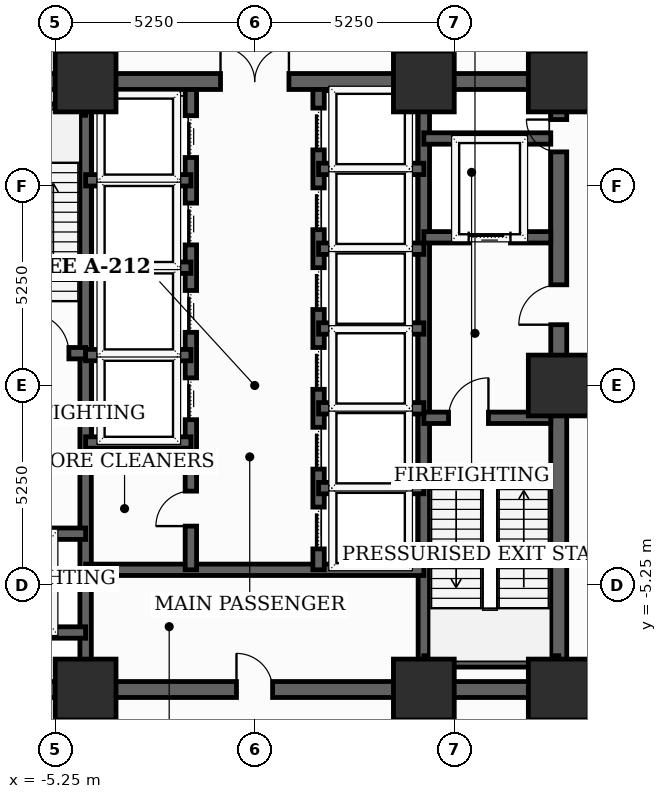
"""IFC4 building model, lengths in metres.
Left out: names, types, materials, properties, quantities, classifications, styles, units other than length and angle.
Written with IfcOpenShell. Run it as: python <this file> out.ifc"""

import sys

from ifc_helpers import new_model, si_unit, direction, frame, frame_2d, origin, origin_2d, place, context, subcontext, project, spatial, rectangle, extrude, element, fill, save


model = new_model("IFC4")
c1 = context("Model", 3, precision=1e-05, world=origin(), true_north=direction((0.0, 1.0)))
c2 = subcontext(c1, "Body", "Model", "MODEL_VIEW")
j1 = project(units=[si_unit("LENGTHUNIT", "METRE"), si_unit("PLANEANGLEUNIT", "RADIAN")], contexts=[c1])
p1 = place(None, origin())
s1 = spatial("IfcSite", under=j1, at=p1, CompositionType="ELEMENT")
p2 = place(p1, origin())
s2 = spatial("IfcBuilding", under=s1, at=p2, CompositionType="ELEMENT")
p3 = place(p2, frame((0.0, 0.0, 10.4)))
s3 = spatial("IfcBuildingStorey", under=s2, at=p3, CompositionType="ELEMENT", Elevation=10.4)
for number, where, z_axis, x_axis in (
    (1, (-4.45, -8.0, 0.0), (0.0, 0.0, 1.0), (1.0, 0.0, 0.0)),
    (2, (4.45, -8.0, 0.0), (0.0, 0.0, 1.0), (1.0, 0.0, 0.0)),
    (3, (8.0, -8.0, 0.0), (0.0, 0.0, 1.0), (1.0, 0.0, 0.0)),
    (4, (8.0, 0.0, 0.0), (0.0, 0.0, 1.0), (1.0, 0.0, 0.0)),
    (5, (8.0, 8.0, 0.0), (0.0, 0.0, 1.0), (1.0, 0.0, 0.0)),
    (6, (4.45, 8.0, 0.0), (0.0, 0.0, 1.0), (1.0, 0.0, 0.0)),
    (7, (-4.45, 8.0, 0.0), (0.0, 0.0, 1.0), (1.0, 0.0, 0.0)),
):
    element("IfcColumn", number, at=place(p3, frame(where, z_axis=z_axis, x_axis=x_axis)), inside=s3, PredefinedType="COLUMN", context=c2, shape_type="SweptSolid", body=[
        extrude(rectangle(XDim=1.6, YDim=1.6, at=origin_2d()), origin(), (0.0, 0.0, 1.0), 5.2),
    ])
p4 = place(p3, frame((8.0, -8.0, 0.0), z_axis=(0.0, 0.0, 1.0), x_axis=(0.0, 1.0, 0.0)))
e8 = element("IfcWall", 8, at=p4, inside=s3, PredefinedType="SHEAR", context=c2, shape_type="SweptSolid", body=[
    extrude(rectangle(XDim=16.0, YDim=0.42, at=frame_2d((8.0, 0.0))), origin(), (0.0, 0.0, 1.0), 4.95),
])
p5 = place(p4, frame((9.6, 0.0, 0.0)))
e9 = element("IfcOpeningElement", 9, at=p5, cuts=e8, PredefinedType="OPENING", context=c2, shape_type="SweptSolid", body=[
    extrude(rectangle(XDim=1.05, YDim=2.15, at=frame_2d((0.525, 1.075))), frame((0.0, 0.22, 0.0), z_axis=(0.0, -1.0, 0.0), x_axis=(1.0, 0.0, 0.0)), (0.0, 0.0, 1.0), 0.44),
])
p6 = place(p4, frame((14.148, 0.0, 0.0)))
e10 = element("IfcOpeningElement", 10, at=p6, cuts=e8, PredefinedType="OPENING", context=c2, shape_type="SweptSolid", body=[
    extrude(rectangle(XDim=0.85, YDim=2.02, at=frame_2d((0.425, 1.01))), frame((0.0, 0.22, 0.0), z_axis=(0.0, -1.0, 0.0), x_axis=(1.0, 0.0, 0.0)), (0.0, 0.0, 1.0), 0.44),
])
p7 = place(p3, frame((-8.0, -8.0, 0.0), z_axis=(0.0, 0.0, 1.0), x_axis=(1.0, 0.0, 0.0)))
e11 = element("IfcWall", 11, at=p7, inside=s3, PredefinedType="SHEAR", context=c2, shape_type="SweptSolid", body=[
    extrude(rectangle(XDim=16.0, YDim=0.42, at=frame_2d((8.0, 0.0))), origin(), (0.0, 0.0, 1.0), 4.95),
])
p8 = place(p7, frame((7.52, 0.0, 0.0)))
e12 = element("IfcOpeningElement", 12, at=p8, cuts=e11, PredefinedType="OPENING", context=c2, shape_type="SweptSolid", body=[
    extrude(rectangle(XDim=0.95, YDim=2.1, at=frame_2d((0.475, 1.05))), frame((0.0, 0.22, 0.0), z_axis=(0.0, -1.0, 0.0), x_axis=(1.0, 0.0, 0.0)), (0.0, 0.0, 1.0), 0.44),
])
p9 = place(p3, frame((-8.0, 8.0, 0.0), z_axis=(0.0, 0.0, 1.0), x_axis=(1.0, 0.0, 0.0)))
e13 = element("IfcWall", 13, at=p9, inside=s3, PredefinedType="SHEAR", context=c2, shape_type="SweptSolid", body=[
    extrude(rectangle(XDim=16.0, YDim=0.42, at=frame_2d((8.0, 0.0))), origin(), (0.0, 0.0, 1.0), 4.95),
])
p10 = place(p9, frame((7.1, 0.0, 0.0)))
e14 = element("IfcOpeningElement", 14, at=p10, cuts=e13, PredefinedType="OPENING", context=c2, shape_type="SweptSolid", body=[
    extrude(rectangle(XDim=1.8, YDim=2.15, at=frame_2d((0.9, 1.075))), frame((0.0, 0.22, 0.0), z_axis=(0.0, -1.0, 0.0), x_axis=(1.0, 0.0, 0.0)), (0.0, 0.0, 1.0), 0.44),
])
for number, where, z_axis, x_axis in (
    (15, (-4.45, -7.79, 0.0), (0.0, 0.0, 1.0), (0.0, 1.0, 0.0)),
    (16, (4.45, -7.79, 0.0), (0.0, 0.0, 1.0), (0.0, 1.0, 0.0)),
):
    element("IfcWall", number, at=place(p3, frame(where, z_axis=z_axis, x_axis=x_axis)), inside=s3, PredefinedType="SHEAR", context=c2, shape_type="SweptSolid", body=[
        extrude(rectangle(XDim=15.58, YDim=0.3, at=frame_2d((7.79, 0.0))), origin(), (0.0, 0.0, 1.0), 4.95),
    ])
p11 = place(p3, frame((-7.79, 0.85, 0.0), z_axis=(0.0, 0.0, 1.0), x_axis=(1.0, 0.0, 0.0)))
e17 = element("IfcWall", 17, at=p11, inside=s3, PredefinedType="SHEAR", context=c2, shape_type="SweptSolid", body=[
    extrude(rectangle(XDim=3.34, YDim=0.3, at=frame_2d((1.67, 0.0))), origin(), (0.0, 0.0, 1.0), 4.95),
])
p12 = place(p11, frame((1.85, 0.0, 0.0)))
e18 = element("IfcOpeningElement", 18, at=p12, cuts=e17, PredefinedType="OPENING", context=c2, shape_type="SweptSolid", body=[
    extrude(rectangle(XDim=1.05, YDim=2.15, at=frame_2d((0.525, 1.075))), frame((0.0, 0.16, 0.0), z_axis=(0.0, -1.0, 0.0), x_axis=(1.0, 0.0, 0.0)), (0.0, 0.0, 1.0), 0.32),
])
p13 = place(p3, frame((-7.79, 7.26, 0.0), z_axis=(0.0, 0.0, 1.0), x_axis=(1.0, 0.0, 0.0)))
e19 = element("IfcWall", 19, at=p13, inside=s3, PredefinedType="SHEAR", context=c2, shape_type="SweptSolid", body=[
    extrude(rectangle(XDim=3.34, YDim=0.3, at=frame_2d((1.67, 0.0))), origin(), (0.0, 0.0, 1.0), 4.95),
])
p14 = place(p3, frame((4.45, -0.85, 0.0), z_axis=(0.0, 0.0, 1.0), x_axis=(1.0, 0.0, 0.0)))
e20 = element("IfcWall", 20, at=p14, inside=s3, PredefinedType="SHEAR", context=c2, shape_type="SweptSolid", body=[
    extrude(rectangle(XDim=3.34, YDim=0.3, at=frame_2d((1.67, 0.0))), origin(), (0.0, 0.0, 1.0), 4.95),
])
p15 = place(p14, frame((0.65, 0.0, 0.0)))
e21 = element("IfcOpeningElement", 21, at=p15, cuts=e20, PredefinedType="OPENING", context=c2, shape_type="SweptSolid", body=[
    extrude(rectangle(XDim=1.05, YDim=2.15, at=frame_2d((0.525, 1.075))), frame((0.0, 0.16, 0.0), z_axis=(0.0, -1.0, 0.0), x_axis=(1.0, 0.0, 0.0)), (0.0, 0.0, 1.0), 0.32),
])
p16 = place(p3, frame((4.45, -7.26, 0.0), z_axis=(0.0, 0.0, 1.0), x_axis=(1.0, 0.0, 0.0)))
e22 = element("IfcWall", 22, at=p16, inside=s3, PredefinedType="SHEAR", context=c2, shape_type="SweptSolid", body=[
    extrude(rectangle(XDim=3.55, YDim=0.3, at=frame_2d((1.775, 0.0))), origin(), (0.0, 0.0, 1.0), 4.95),
])
p17 = place(p3, frame((-7.79, -3.9, 0.0), z_axis=(0.0, 0.0, 1.0), x_axis=(1.0, 0.0, 0.0)))
e23 = element("IfcWall", 23, at=p17, inside=s3, PredefinedType="SHEAR", context=c2, shape_type="SweptSolid", body=[
    extrude(rectangle(XDim=3.34, YDim=0.3, at=frame_2d((1.67, 0.0))), origin(), (0.0, 0.0, 1.0), 4.95),
])
p18 = place(p17, frame((1.27, 0.0, 0.0)))
e24 = element("IfcOpeningElement", 24, at=p18, cuts=e23, PredefinedType="OPENING", context=c2, shape_type="SweptSolid", body=[
    extrude(rectangle(XDim=1.1, YDim=2.1, at=frame_2d((0.55, 1.05))), frame((0.0, 0.16, 0.0), z_axis=(0.0, -1.0, 0.0), x_axis=(1.0, 0.0, 0.0)), (0.0, 0.0, 1.0), 0.32),
])
p19 = place(p3, frame((-7.79, -6.5, 0.0), z_axis=(0.0, 0.0, 1.0), x_axis=(1.0, 0.0, 0.0)))
e25 = element("IfcWall", 25, at=p19, inside=s3, PredefinedType="SHEAR", context=c2, shape_type="SweptSolid", body=[
    extrude(rectangle(XDim=3.34, YDim=0.3, at=frame_2d((1.67, 0.0))), origin(), (0.0, 0.0, 1.0), 4.95),
])
p20 = place(p3, frame((4.45, 3.9, 0.0), z_axis=(0.0, 0.0, 1.0), x_axis=(1.0, 0.0, 0.0)))
e26 = element("IfcWall", 26, at=p20, inside=s3, PredefinedType="SHEAR", context=c2, shape_type="SweptSolid", body=[
    extrude(rectangle(XDim=3.34, YDim=0.3, at=frame_2d((1.67, 0.0))), origin(), (0.0, 0.0, 1.0), 4.95),
])
p21 = place(p20, frame((1.18, 0.0, 0.0)))
e27 = element("IfcOpeningElement", 27, at=p21, cuts=e26, PredefinedType="OPENING", context=c2, shape_type="SweptSolid", body=[
    extrude(rectangle(XDim=1.1, YDim=2.1, at=frame_2d((0.55, 1.05))), frame((0.0, 0.16, 0.0), z_axis=(0.0, -1.0, 0.0), x_axis=(1.0, 0.0, 0.0)), (0.0, 0.0, 1.0), 0.32),
])
p22 = place(p3, frame((4.45, 6.5, 0.0), z_axis=(0.0, 0.0, 1.0), x_axis=(1.0, 0.0, 0.0)))
e28 = element("IfcWall", 28, at=p22, inside=s3, PredefinedType="SHEAR", context=c2, shape_type="SweptSolid", body=[
    extrude(rectangle(XDim=3.34, YDim=0.3, at=frame_2d((1.67, 0.0))), origin(), (0.0, 0.0, 1.0), 4.95),
])
p23 = place(p3, frame((-4.45, -4.85, 0.0), z_axis=(0.0, 0.0, 1.0), x_axis=(1.0, 0.0, 0.0)))
e29 = element("IfcWall", 29, at=p23, inside=s3, PredefinedType="SHEAR", context=c2, shape_type="SweptSolid", body=[
    extrude(rectangle(XDim=8.9, YDim=0.3, at=frame_2d((4.45, 0.0))), origin(), (0.0, 0.0, 1.0), 4.95),
])
p24 = place(p3, frame((-1.68, -4.85, 0.0), z_axis=(0.0, 0.0, 1.0), x_axis=(0.0, 1.0, 0.0)))
e30 = element("IfcWall", 30, at=p24, inside=s3, PredefinedType="SHEAR", context=c2, shape_type="SweptSolid", body=[
    extrude(rectangle(XDim=12.64, YDim=0.3, at=frame_2d((6.32, 0.0))), origin(), (0.0, 0.0, 1.0), 4.95),
])
p25 = place(p24, frame((3.95, 0.0, 0.0)))
e31 = element("IfcOpeningElement", 31, at=p25, cuts=e30, PredefinedType="OPENING", context=c2, shape_type="SweptSolid", body=[
    extrude(rectangle(XDim=1.1, YDim=2.1, at=frame_2d((0.55, 1.05))), frame((0.0, 0.16, 0.0), z_axis=(0.0, -1.0, 0.0), x_axis=(1.0, 0.0, 0.0)), (0.0, 0.0, 1.0), 0.32),
])
p26 = place(p24, frame((6.25, 0.0, 0.0)))
e32 = element("IfcOpeningElement", 32, at=p26, cuts=e30, PredefinedType="OPENING", context=c2, shape_type="SweptSolid", body=[
    extrude(rectangle(XDim=1.1, YDim=2.1, at=frame_2d((0.55, 1.05))), frame((0.0, 0.16, 0.0), z_axis=(0.0, -1.0, 0.0), x_axis=(1.0, 0.0, 0.0)), (0.0, 0.0, 1.0), 0.32),
])
p27 = place(p24, frame((8.55, 0.0, 0.0)))
e33 = element("IfcOpeningElement", 33, at=p27, cuts=e30, PredefinedType="OPENING", context=c2, shape_type="SweptSolid", body=[
    extrude(rectangle(XDim=1.1, YDim=2.1, at=frame_2d((0.55, 1.05))), frame((0.0, 0.16, 0.0), z_axis=(0.0, -1.0, 0.0), x_axis=(1.0, 0.0, 0.0)), (0.0, 0.0, 1.0), 0.32),
])
p28 = place(p24, frame((10.85, 0.0, 0.0)))
e34 = element("IfcOpeningElement", 34, at=p28, cuts=e30, PredefinedType="OPENING", context=c2, shape_type="SweptSolid", body=[
    extrude(rectangle(XDim=1.1, YDim=2.1, at=frame_2d((0.55, 1.05))), frame((0.0, 0.16, 0.0), z_axis=(0.0, -1.0, 0.0), x_axis=(1.0, 0.0, 0.0)), (0.0, 0.0, 1.0), 0.32),
])
p29 = place(p24, frame((1.15, 0.0, 0.0)))
e35 = element("IfcOpeningElement", 35, at=p29, cuts=e30, PredefinedType="OPENING", context=c2, shape_type="SweptSolid", body=[
    extrude(rectangle(XDim=0.92, YDim=2.1, at=frame_2d((0.46, 1.05))), frame((0.0, 0.16, 0.0), z_axis=(0.0, -1.0, 0.0), x_axis=(1.0, 0.0, 0.0)), (0.0, 0.0, 1.0), 0.32),
])
p30 = place(p3, frame((1.68, -4.85, 0.0), z_axis=(0.0, 0.0, 1.0), x_axis=(0.0, 1.0, 0.0)))
e36 = element("IfcWall", 36, at=p30, inside=s3, PredefinedType="SHEAR", context=c2, shape_type="SweptSolid", body=[
    extrude(rectangle(XDim=12.64, YDim=0.3, at=frame_2d((6.32, 0.0))), origin(), (0.0, 0.0, 1.0), 4.95),
])
p31 = place(p30, frame((0.55, 0.0, 0.0)))
e37 = element("IfcOpeningElement", 37, at=p31, cuts=e36, PredefinedType="OPENING", context=c2, shape_type="SweptSolid", body=[
    extrude(rectangle(XDim=1.1, YDim=2.1, at=frame_2d((0.55, 1.05))), frame((0.0, 0.16, 0.0), z_axis=(0.0, -1.0, 0.0), x_axis=(1.0, 0.0, 0.0)), (0.0, 0.0, 1.0), 0.32),
])
p32 = place(p30, frame((2.65, 0.0, 0.0)))
e38 = element("IfcOpeningElement", 38, at=p32, cuts=e36, PredefinedType="OPENING", context=c2, shape_type="SweptSolid", body=[
    extrude(rectangle(XDim=1.1, YDim=2.1, at=frame_2d((0.55, 1.05))), frame((0.0, 0.16, 0.0), z_axis=(0.0, -1.0, 0.0), x_axis=(1.0, 0.0, 0.0)), (0.0, 0.0, 1.0), 0.32),
])
p33 = place(p30, frame((4.75, 0.0, 0.0)))
e39 = element("IfcOpeningElement", 39, at=p33, cuts=e36, PredefinedType="OPENING", context=c2, shape_type="SweptSolid", body=[
    extrude(rectangle(XDim=1.1, YDim=2.1, at=frame_2d((0.55, 1.05))), frame((0.0, 0.16, 0.0), z_axis=(0.0, -1.0, 0.0), x_axis=(1.0, 0.0, 0.0)), (0.0, 0.0, 1.0), 0.32),
])
p34 = place(p30, frame((6.85, 0.0, 0.0)))
e40 = element("IfcOpeningElement", 40, at=p34, cuts=e36, PredefinedType="OPENING", context=c2, shape_type="SweptSolid", body=[
    extrude(rectangle(XDim=1.1, YDim=2.1, at=frame_2d((0.55, 1.05))), frame((0.0, 0.16, 0.0), z_axis=(0.0, -1.0, 0.0), x_axis=(1.0, 0.0, 0.0)), (0.0, 0.0, 1.0), 0.32),
])
p35 = place(p30, frame((8.95, 0.0, 0.0)))
e41 = element("IfcOpeningElement", 41, at=p35, cuts=e36, PredefinedType="OPENING", context=c2, shape_type="SweptSolid", body=[
    extrude(rectangle(XDim=1.1, YDim=2.1, at=frame_2d((0.55, 1.05))), frame((0.0, 0.16, 0.0), z_axis=(0.0, -1.0, 0.0), x_axis=(1.0, 0.0, 0.0)), (0.0, 0.0, 1.0), 0.32),
])
p36 = place(p30, frame((11.05, 0.0, 0.0)))
e42 = element("IfcOpeningElement", 42, at=p36, cuts=e36, PredefinedType="OPENING", context=c2, shape_type="SweptSolid", body=[
    extrude(rectangle(XDim=1.1, YDim=2.1, at=frame_2d((0.55, 1.05))), frame((0.0, 0.16, 0.0), z_axis=(0.0, -1.0, 0.0), x_axis=(1.0, 0.0, 0.0)), (0.0, 0.0, 1.0), 0.32),
])
for number, where, z_axis, x_axis in (
    (43, (-4.45, -1.5, 0.0), (0.0, 0.0, 1.0), (1.0, 0.0, 0.0)),
    (44, (-4.45, 0.8, 0.0), (0.0, 0.0, 1.0), (1.0, 0.0, 0.0)),
    (45, (-4.45, 3.1, 0.0), (0.0, 0.0, 1.0), (1.0, 0.0, 0.0)),
    (46, (-4.45, 5.4, 0.0), (0.0, 0.0, 1.0), (1.0, 0.0, 0.0)),
    (47, (1.68, 1.5, 0.0), (0.0, 0.0, 1.0), (1.0, 0.0, 0.0)),
    (48, (1.68, 3.6, 0.0), (0.0, 0.0, 1.0), (1.0, 0.0, 0.0)),
    (49, (1.68, 5.7, 0.0), (0.0, 0.0, 1.0), (1.0, 0.0, 0.0)),
    (50, (1.68, -2.7, 0.0), (0.0, 0.0, 1.0), (1.0, 0.0, 0.0)),
    (51, (1.68, -0.6, 0.0), (0.0, 0.0, 1.0), (1.0, 0.0, 0.0)),
):
    element("IfcWall", number, at=place(p3, frame(where, z_axis=z_axis, x_axis=x_axis)), inside=s3, PredefinedType="SHEAR", context=c2, shape_type="SweptSolid", body=[
        extrude(rectangle(XDim=2.77, YDim=0.3, at=frame_2d((1.385, 0.0))), origin(), (0.0, 0.0, 1.0), 4.95),
    ])
p37 = place(p5, origin())
e52 = element("IfcDoor", 52, at=p37, inside=s3, OperationType="SINGLE_SWING_LEFT", PredefinedType="DOOR", context=c2, shape_type="SweptSolid", body=[
    extrude(rectangle(XDim=1.05, YDim=2.15, at=frame_2d((0.525, 1.075))), frame((0.0, 0.025, 0.0), z_axis=(0.0, -1.0, 0.0), x_axis=(1.0, 0.0, 0.0)), (0.0, 0.0, 1.0), 0.05),
])
fill(e9, e52)
p38 = place(p6, origin())
e53 = element("IfcDoor", 53, at=p38, inside=s3, OperationType="SINGLE_SWING_RIGHT", PredefinedType="TRAPDOOR", context=c2, shape_type="SweptSolid", body=[
    extrude(rectangle(XDim=0.85, YDim=2.02, at=frame_2d((0.425, 1.01))), frame((0.0, 0.025, 0.0), z_axis=(0.0, -1.0, 0.0), x_axis=(1.0, 0.0, 0.0)), (0.0, 0.0, 1.0), 0.05),
])
fill(e10, e53)
p39 = place(p8, origin())
e54 = element("IfcDoor", 54, at=p39, inside=s3, OperationType="SINGLE_SWING_LEFT", PredefinedType="DOOR", context=c2, shape_type="SweptSolid", body=[
    extrude(rectangle(XDim=0.95, YDim=2.1, at=frame_2d((0.475, 1.05))), frame((0.0, 0.025, 0.0), z_axis=(0.0, -1.0, 0.0), x_axis=(1.0, 0.0, 0.0)), (0.0, 0.0, 1.0), 0.05),
])
fill(e12, e54)
p40 = place(p10, origin())
e55 = element("IfcDoor", 55, at=p40, inside=s3, OperationType="DOUBLE_DOOR_SINGLE_SWING", PredefinedType="DOOR", context=c2, shape_type="SweptSolid", body=[
    extrude(rectangle(XDim=1.8, YDim=2.15, at=frame_2d((0.9, 1.075))), frame((0.0, 0.025, 0.0), z_axis=(0.0, -1.0, 0.0), x_axis=(1.0, 0.0, 0.0)), (0.0, 0.0, 1.0), 0.05),
])
fill(e14, e55)
p41 = place(p12, origin())
e56 = element("IfcDoor", 56, at=p41, inside=s3, OperationType="SINGLE_SWING_LEFT", PredefinedType="DOOR", context=c2, shape_type="SweptSolid", body=[
    extrude(rectangle(XDim=1.05, YDim=2.15, at=frame_2d((0.525, 1.075))), frame((0.0, 0.025, 0.0), z_axis=(0.0, -1.0, 0.0), x_axis=(1.0, 0.0, 0.0)), (0.0, 0.0, 1.0), 0.05),
])
fill(e18, e56)
p42 = place(p15, origin())
e57 = element("IfcDoor", 57, at=p42, inside=s3, OperationType="SINGLE_SWING_RIGHT", PredefinedType="DOOR", context=c2, shape_type="SweptSolid", body=[
    extrude(rectangle(XDim=1.05, YDim=2.15, at=frame_2d((0.525, 1.075))), frame((0.0, 0.025, 0.0), z_axis=(0.0, -1.0, 0.0), x_axis=(1.0, 0.0, 0.0)), (0.0, 0.0, 1.0), 0.05),
])
fill(e21, e57)
p43 = place(p21, origin())
e58 = element("IfcDoor", 58, at=p43, inside=s3, OperationType="SLIDING_TO_LEFT", PredefinedType="DOOR", context=c2, shape_type="SweptSolid", body=[
    extrude(rectangle(XDim=1.1, YDim=2.1, at=frame_2d((0.55, 1.05))), frame((0.0, 0.025, 0.0), z_axis=(0.0, -1.0, 0.0), x_axis=(1.0, 0.0, 0.0)), (0.0, 0.0, 1.0), 0.05),
])
fill(e27, e58)
p44 = place(p25, origin())
e59 = element("IfcDoor", 59, at=p44, inside=s3, OperationType="SLIDING_TO_LEFT", PredefinedType="DOOR", context=c2, shape_type="SweptSolid", body=[
    extrude(rectangle(XDim=1.1, YDim=2.1, at=frame_2d((0.55, 1.05))), frame((0.0, 0.025, 0.0), z_axis=(0.0, -1.0, 0.0), x_axis=(1.0, 0.0, 0.0)), (0.0, 0.0, 1.0), 0.05),
])
fill(e31, e59)
p45 = place(p26, origin())
e60 = element("IfcDoor", 60, at=p45, inside=s3, OperationType="SLIDING_TO_LEFT", PredefinedType="DOOR", context=c2, shape_type="SweptSolid", body=[
    extrude(rectangle(XDim=1.1, YDim=2.1, at=frame_2d((0.55, 1.05))), frame((0.0, 0.025, 0.0), z_axis=(0.0, -1.0, 0.0), x_axis=(1.0, 0.0, 0.0)), (0.0, 0.0, 1.0), 0.05),
])
fill(e32, e60)
p46 = place(p27, origin())
e61 = element("IfcDoor", 61, at=p46, inside=s3, OperationType="SLIDING_TO_LEFT", PredefinedType="DOOR", context=c2, shape_type="SweptSolid", body=[
    extrude(rectangle(XDim=1.1, YDim=2.1, at=frame_2d((0.55, 1.05))), frame((0.0, 0.025, 0.0), z_axis=(0.0, -1.0, 0.0), x_axis=(1.0, 0.0, 0.0)), (0.0, 0.0, 1.0), 0.05),
])
fill(e33, e61)
p47 = place(p28, origin())
e62 = element("IfcDoor", 62, at=p47, inside=s3, OperationType="SLIDING_TO_LEFT", PredefinedType="DOOR", context=c2, shape_type="SweptSolid", body=[
    extrude(rectangle(XDim=1.1, YDim=2.1, at=frame_2d((0.55, 1.05))), frame((0.0, 0.025, 0.0), z_axis=(0.0, -1.0, 0.0), x_axis=(1.0, 0.0, 0.0)), (0.0, 0.0, 1.0), 0.05),
])
fill(e34, e62)
p48 = place(p29, origin())
e63 = element("IfcDoor", 63, at=p48, inside=s3, OperationType="SINGLE_SWING_LEFT", PredefinedType="DOOR", context=c2, shape_type="SweptSolid", body=[
    extrude(rectangle(XDim=0.92, YDim=2.1, at=frame_2d((0.46, 1.05))), frame((0.0, 0.025, 0.0), z_axis=(0.0, -1.0, 0.0), x_axis=(1.0, 0.0, 0.0)), (0.0, 0.0, 1.0), 0.05),
])
fill(e35, e63)
p49 = place(p31, origin())
e64 = element("IfcDoor", 64, at=p49, inside=s3, OperationType="SLIDING_TO_LEFT", PredefinedType="DOOR", context=c2, shape_type="SweptSolid", body=[
    extrude(rectangle(XDim=1.1, YDim=2.1, at=frame_2d((0.55, 1.05))), frame((0.0, 0.025, 0.0), z_axis=(0.0, -1.0, 0.0), x_axis=(1.0, 0.0, 0.0)), (0.0, 0.0, 1.0), 0.05),
])
fill(e37, e64)
p50 = place(p32, origin())
e65 = element("IfcDoor", 65, at=p50, inside=s3, OperationType="SLIDING_TO_LEFT", PredefinedType="DOOR", context=c2, shape_type="SweptSolid", body=[
    extrude(rectangle(XDim=1.1, YDim=2.1, at=frame_2d((0.55, 1.05))), frame((0.0, 0.025, 0.0), z_axis=(0.0, -1.0, 0.0), x_axis=(1.0, 0.0, 0.0)), (0.0, 0.0, 1.0), 0.05),
])
fill(e38, e65)
p51 = place(p33, origin())
e66 = element("IfcDoor", 66, at=p51, inside=s3, OperationType="SLIDING_TO_LEFT", PredefinedType="DOOR", context=c2, shape_type="SweptSolid", body=[
    extrude(rectangle(XDim=1.1, YDim=2.1, at=frame_2d((0.55, 1.05))), frame((0.0, 0.025, 0.0), z_axis=(0.0, -1.0, 0.0), x_axis=(1.0, 0.0, 0.0)), (0.0, 0.0, 1.0), 0.05),
])
fill(e39, e66)
p52 = place(p34, origin())
e67 = element("IfcDoor", 67, at=p52, inside=s3, OperationType="SLIDING_TO_LEFT", PredefinedType="DOOR", context=c2, shape_type="SweptSolid", body=[
    extrude(rectangle(XDim=1.1, YDim=2.1, at=frame_2d((0.55, 1.05))), frame((0.0, 0.025, 0.0), z_axis=(0.0, -1.0, 0.0), x_axis=(1.0, 0.0, 0.0)), (0.0, 0.0, 1.0), 0.05),
])
fill(e40, e67)
p53 = place(p35, origin())
e68 = element("IfcDoor", 68, at=p53, inside=s3, OperationType="SLIDING_TO_LEFT", PredefinedType="DOOR", context=c2, shape_type="SweptSolid", body=[
    extrude(rectangle(XDim=1.1, YDim=2.1, at=frame_2d((0.55, 1.05))), frame((0.0, 0.025, 0.0), z_axis=(0.0, -1.0, 0.0), x_axis=(1.0, 0.0, 0.0)), (0.0, 0.0, 1.0), 0.05),
])
fill(e41, e68)
p54 = place(p36, origin())
e69 = element("IfcDoor", 69, at=p54, inside=s3, OperationType="SLIDING_TO_LEFT", PredefinedType="DOOR", context=c2, shape_type="SweptSolid", body=[
    extrude(rectangle(XDim=1.1, YDim=2.1, at=frame_2d((0.55, 1.05))), frame((0.0, 0.025, 0.0), z_axis=(0.0, -1.0, 0.0), x_axis=(1.0, 0.0, 0.0)), (0.0, 0.0, 1.0), 0.05),
])
fill(e42, e69)
save(model, sys.argv[1])
